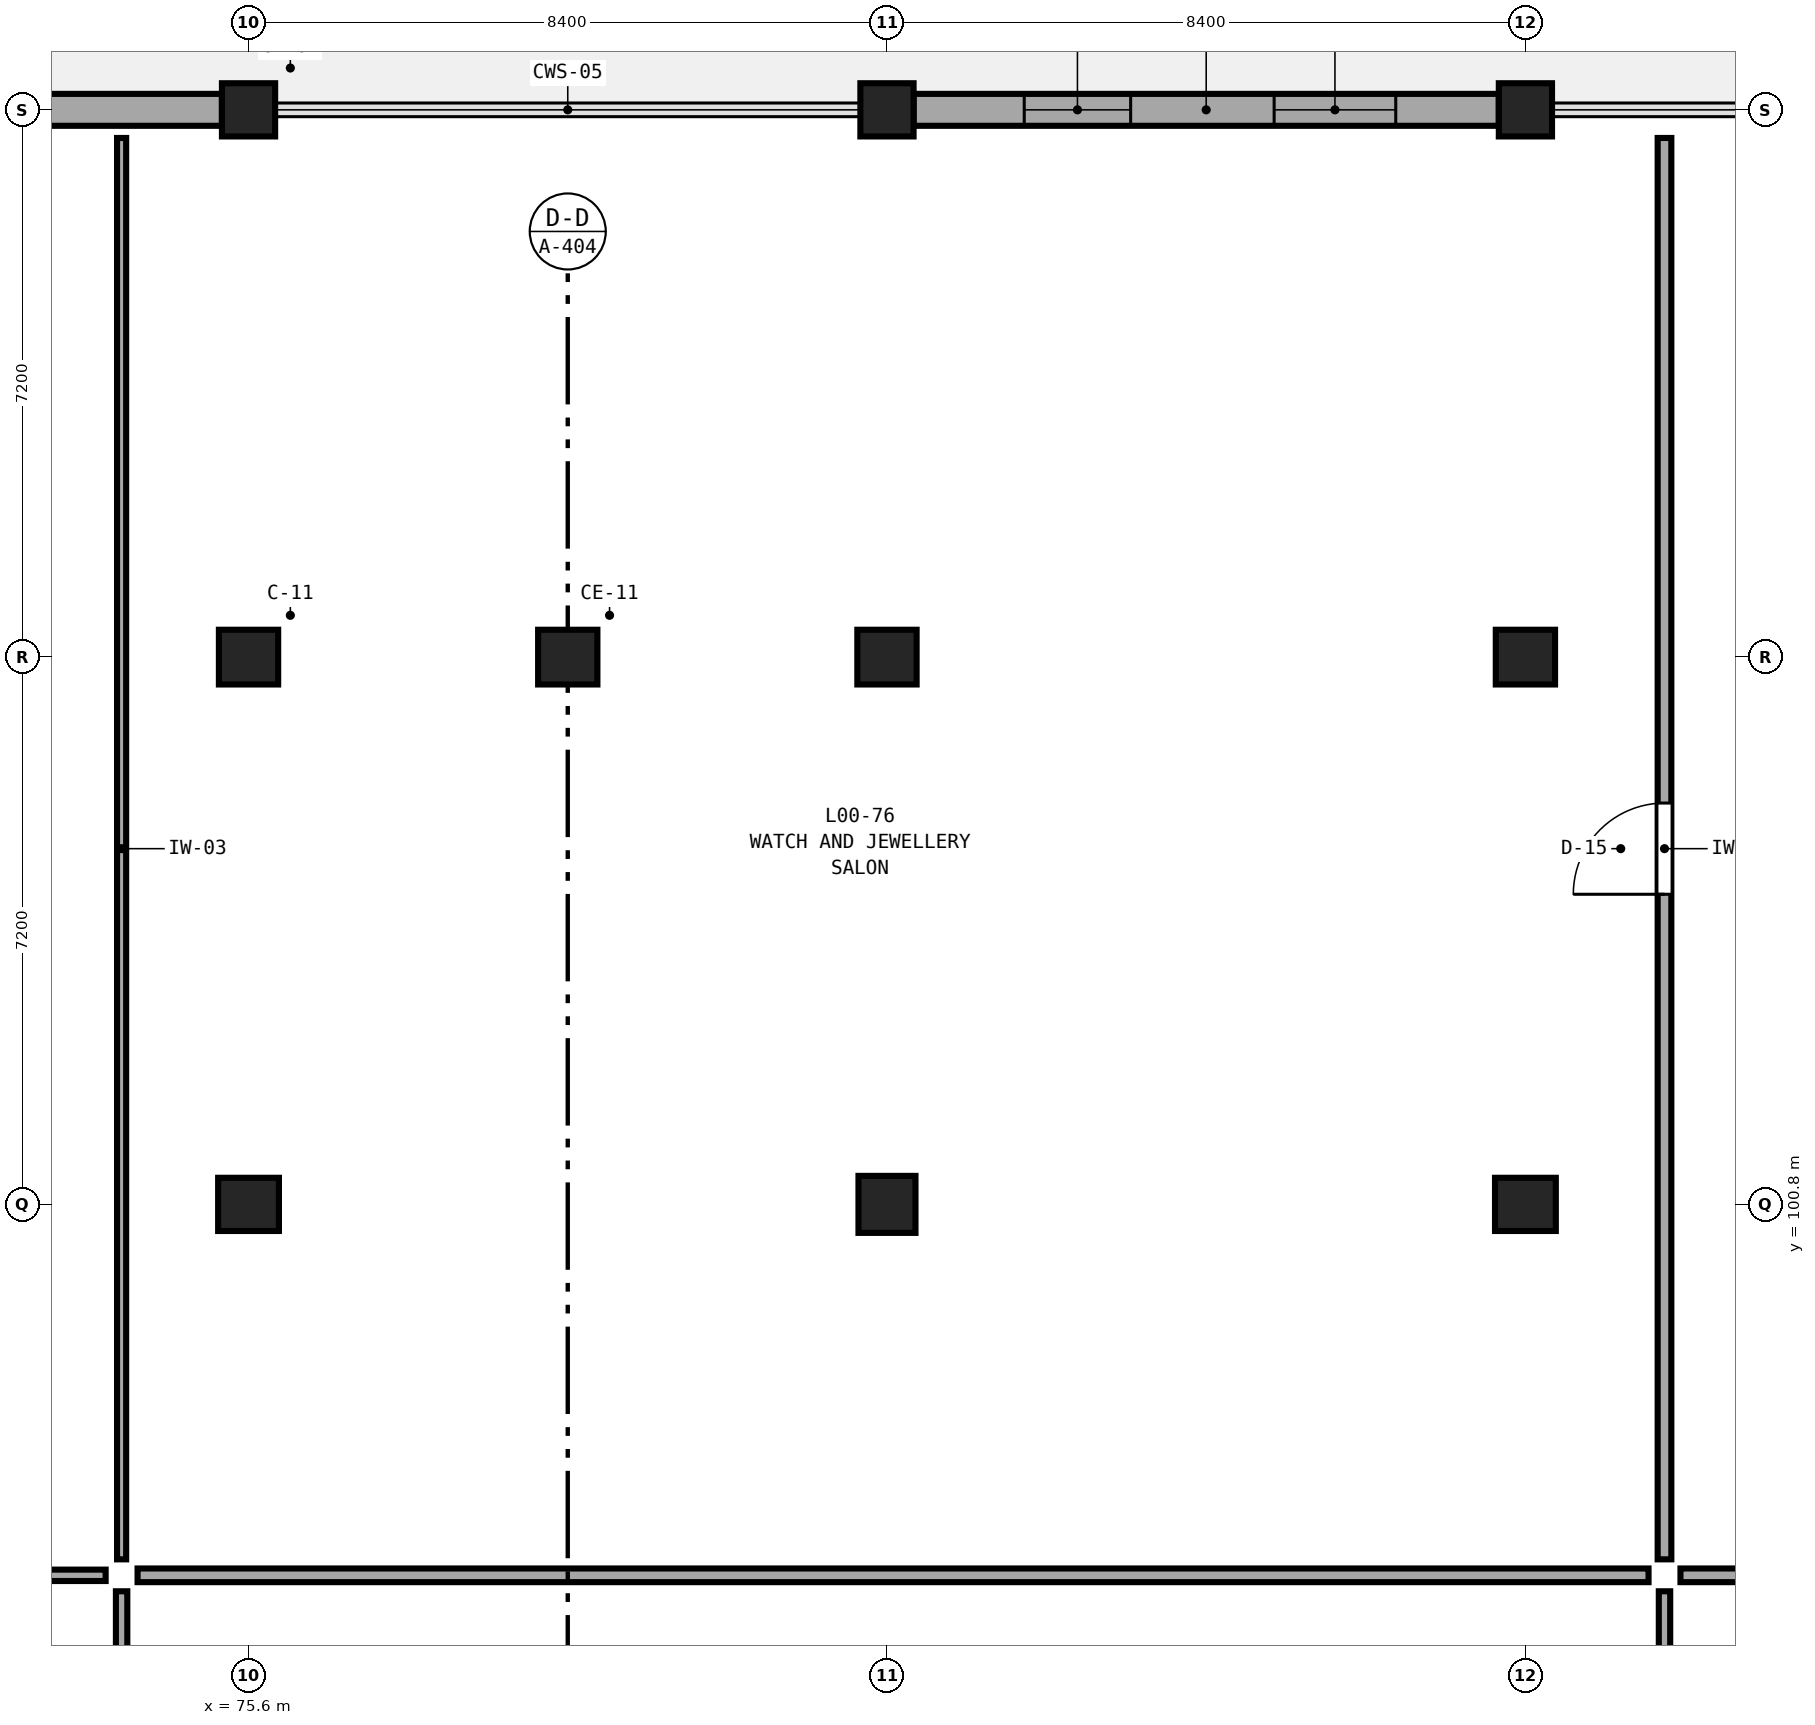
"""IFC4 building model, lengths in metres.
Left out: names, types, materials, properties, quantities, classifications, styles, units other than length and angle.
Written with IfcOpenShell. Run it as: python <this file> out.ifc"""

import sys

from ifc_helpers import new_model, si_unit, direction, frame, frame_2d, origin, origin_2d, place, context, subcontext, project, spatial, rectangle, extrude, element, fill, save


model = new_model("IFC4")
c1 = context("Model", 3, precision=1e-05, world=origin(), true_north=direction((0.0, 1.0)))
c2 = subcontext(c1, "Body", "Model", "MODEL_VIEW")
j1 = project(units=[si_unit("LENGTHUNIT", "METRE"), si_unit("PLANEANGLEUNIT", "RADIAN")], contexts=[c1])
p1 = place(None, origin())
s1 = spatial("IfcSite", under=j1, at=p1, CompositionType="ELEMENT")
p2 = place(p1, origin())
s2 = spatial("IfcBuilding", under=s1, at=p2, CompositionType="ELEMENT")
p3 = place(p2, origin())
s3 = spatial("IfcBuildingStorey", under=s2, at=p3, CompositionType="ELEMENT", Elevation=0.0)
p4 = place(p3, frame((75.6, 100.8, 0.0), z_axis=(0.0, 0.0, 1.0), x_axis=(1.0, 0.0, 0.0)))
e1 = element("IfcColumn", 1, at=p4, inside=s3, PredefinedType="COLUMN", context=c2, shape_type="SweptSolid", body=[
    extrude(rectangle(XDim=0.8, YDim=0.7, at=origin_2d()), origin(), (0.0, 0.0, 1.0), 5.4),
])
p5 = place(p3, frame((75.6, 108.0, 0.0), z_axis=(0.0, 0.0, 1.0), x_axis=(1.0, 0.0, 0.0)))
e2 = element("IfcColumn", 2, at=p5, inside=s3, PredefinedType="PILASTER", context=c2, shape_type="SweptSolid", body=[
    extrude(rectangle(XDim=0.78, YDim=0.72, at=origin_2d()), origin(), (0.0, 0.0, 1.0), 5.4),
])
p6 = place(p3, frame((75.6, 115.2, 0.0), z_axis=(0.0, 0.0, 1.0), x_axis=(1.0, 0.0, 0.0)))
e3 = element("IfcColumn", 3, at=p6, inside=s3, PredefinedType="COLUMN", context=c2, shape_type="SweptSolid", body=[
    extrude(rectangle(XDim=0.7, YDim=0.7, at=origin_2d()), origin(), (0.0, 0.0, 1.0), 5.4),
])
p7 = place(p3, frame((84.0, 100.8, 0.0), z_axis=(0.0, 0.0, 1.0), x_axis=(1.0, 0.0, 0.0)))
e4 = element("IfcColumn", 4, at=p7, inside=s3, PredefinedType="COLUMN", context=c2, shape_type="SweptSolid", body=[
    extrude(rectangle(XDim=0.75, YDim=0.75, at=origin_2d()), origin(), (0.0, 0.0, 1.0), 5.4),
])
p8 = place(p3, frame((84.0, 108.0, 0.0), z_axis=(0.0, 0.0, 1.0), x_axis=(1.0, 0.0, 0.0)))
e5 = element("IfcColumn", 5, at=p8, inside=s3, PredefinedType="PILASTER", context=c2, shape_type="SweptSolid", body=[
    extrude(rectangle(XDim=0.78, YDim=0.72, at=origin_2d()), origin(), (0.0, 0.0, 1.0), 5.4),
])
p9 = place(p3, frame((84.0, 115.2, 0.0), z_axis=(0.0, 0.0, 1.0), x_axis=(1.0, 0.0, 0.0)))
e6 = element("IfcColumn", 6, at=p9, inside=s3, PredefinedType="COLUMN", context=c2, shape_type="SweptSolid", body=[
    extrude(rectangle(XDim=0.7, YDim=0.7, at=origin_2d()), origin(), (0.0, 0.0, 1.0), 5.4),
])
p10 = place(p3, frame((92.4, 100.8, 0.0), z_axis=(0.0, 0.0, 1.0), x_axis=(1.0, 0.0, 0.0)))
e7 = element("IfcColumn", 7, at=p10, inside=s3, PredefinedType="COLUMN", context=c2, shape_type="SweptSolid", body=[
    extrude(rectangle(XDim=0.8, YDim=0.7, at=origin_2d()), origin(), (0.0, 0.0, 1.0), 5.4),
])
p11 = place(p3, frame((92.4, 108.0, 0.0), z_axis=(0.0, 0.0, 1.0), x_axis=(1.0, 0.0, 0.0)))
e8 = element("IfcColumn", 8, at=p11, inside=s3, PredefinedType="PILASTER", context=c2, shape_type="SweptSolid", body=[
    extrude(rectangle(XDim=0.78, YDim=0.72, at=origin_2d()), origin(), (0.0, 0.0, 1.0), 5.4),
])
p12 = place(p3, frame((92.4, 115.2, 0.0), z_axis=(0.0, 0.0, 1.0), x_axis=(1.0, 0.0, 0.0)))
e9 = element("IfcColumn", 9, at=p12, inside=s3, PredefinedType="COLUMN", context=c2, shape_type="SweptSolid", body=[
    extrude(rectangle(XDim=0.7, YDim=0.7, at=origin_2d()), origin(), (0.0, 0.0, 1.0), 5.4),
])
p13 = place(p3, frame((79.8, 108.0, 0.0), z_axis=(0.0, 0.0, 1.0), x_axis=(1.0, 0.0, 0.0)))
e10 = element("IfcColumn", 10, at=p13, inside=s3, PredefinedType="PILASTER", context=c2, shape_type="SweptSolid", body=[
    extrude(rectangle(XDim=0.78, YDim=0.72, at=origin_2d()), origin(), (0.0, 0.0, 1.0), 5.4),
])
p14 = place(p3, frame((67.55, 115.2, 0.0), z_axis=(0.0, 0.0, 1.0), x_axis=(1.0, 0.0, 0.0)))
e11 = element("IfcWall", 11, at=p14, inside=s3, PredefinedType="SOLIDWALL", context=c2, shape_type="SweptSolid", body=[
    extrude(rectangle(XDim=7.7, YDim=0.42, at=frame_2d((3.85, 0.0))), origin(), (0.0, 0.0, 1.0), 4.53),
])
p15 = place(p14, frame((2.85, 0.0, 0.0)))
e12 = element("IfcOpeningElement", 12, at=p15, cuts=e11, PredefinedType="OPENING", context=c2, shape_type="SweptSolid", body=[
    extrude(rectangle(XDim=2.0, YDim=2.4, at=frame_2d((1.0, 1.2))), frame((0.0, 0.23, 0.0), z_axis=(0.0, -1.0, 0.0), x_axis=(1.0, 0.0, 0.0)), (0.0, 0.0, 1.0), 0.46),
])
p16 = place(p3, frame((84.35, 115.2, 0.0), z_axis=(0.0, 0.0, 1.0), x_axis=(1.0, 0.0, 0.0)))
e13 = element("IfcWall", 13, at=p16, inside=s3, PredefinedType="SOLIDWALL", context=c2, shape_type="SweptSolid", body=[
    extrude(rectangle(XDim=7.7, YDim=0.42, at=frame_2d((3.85, 0.0))), origin(), (0.0, 0.0, 1.0), 4.53),
])
p17 = place(p16, frame((1.456, 0.0, 0.75)))
e14 = element("IfcOpeningElement", 14, at=p17, cuts=e13, PredefinedType="OPENING", context=c2, shape_type="SweptSolid", body=[
    extrude(rectangle(XDim=1.4, YDim=2.44, at=frame_2d((0.7, 1.22))), frame((0.0, 0.23, 0.0), z_axis=(0.0, -1.0, 0.0), x_axis=(1.0, 0.0, 0.0)), (0.0, 0.0, 1.0), 0.46),
])
p18 = place(p16, frame((4.744, 0.0, 0.75)))
e15 = element("IfcOpeningElement", 15, at=p18, cuts=e13, PredefinedType="OPENING", context=c2, shape_type="SweptSolid", body=[
    extrude(rectangle(XDim=1.6, YDim=2.44, at=frame_2d((0.8, 1.22))), frame((0.0, 0.23, 0.0), z_axis=(0.0, -1.0, 0.0), x_axis=(1.0, 0.0, 0.0)), (0.0, 0.0, 1.0), 0.46),
])
p19 = place(p3, frame((94.23, 96.13, 0.0), z_axis=(0.0, 0.0, 1.0), x_axis=(0.0, 1.0, 0.0)))
e16 = element("IfcWall", 16, at=p19, inside=s3, PredefinedType="PARTITIONING", context=c2, shape_type="SweptSolid", body=[
    extrude(rectangle(XDim=18.7, YDim=0.18, at=frame_2d((9.35, 0.0))), origin(), (0.0, 0.0, 1.0), 5.08),
])
p20 = place(p19, frame((8.75, 0.0, 0.0)))
e17 = element("IfcOpeningElement", 17, at=p20, cuts=e16, PredefinedType="OPENING", context=c2, shape_type="SweptSolid", body=[
    extrude(rectangle(XDim=1.2, YDim=2.21, at=frame_2d((0.6, 1.105))), frame((0.0, 0.11, 0.0), z_axis=(0.0, -1.0, 0.0), x_axis=(1.0, 0.0, 0.0)), (0.0, 0.0, 1.0), 0.22),
])
p21 = place(p3, frame((56.37, 95.92, 0.0), z_axis=(0.0, 0.0, 1.0), x_axis=(1.0, 0.0, 0.0)))
e18 = element("IfcWall", 18, at=p21, inside=s3, PredefinedType="PARTITIONING", context=c2, shape_type="SweptSolid", body=[
    extrude(rectangle(XDim=17.35, YDim=0.15, at=frame_2d((8.675, 0.0))), origin(), (0.0, 0.0, 1.0), 5.08),
])
p22 = place(p21, frame((7.995, 0.0, 0.0)))
e19 = element("IfcOpeningElement", 19, at=p22, cuts=e18, PredefinedType="OPENING", context=c2, shape_type="SweptSolid", body=[
    extrude(rectangle(XDim=1.36, YDim=2.37, at=frame_2d((0.68, 1.185))), frame((0.0, 0.095, 0.0), z_axis=(0.0, -1.0, 0.0), x_axis=(1.0, 0.0, 0.0)), (0.0, 0.0, 1.0), 0.19),
])
p23 = place(p3, frame((94.23, 86.09, 0.0), z_axis=(0.0, 0.0, 1.0), x_axis=(0.0, 1.0, 0.0)))
e20 = element("IfcWall", 20, at=p23, inside=s3, PredefinedType="PARTITIONING", context=c2, shape_type="SweptSolid", body=[
    extrude(rectangle(XDim=9.62, YDim=0.15, at=frame_2d((4.81, 0.0))), origin(), (0.0, 0.0, 1.0), 5.08),
])
p24 = place(p23, frame((4.37, 0.0, 0.0)))
e21 = element("IfcOpeningElement", 21, at=p24, cuts=e20, PredefinedType="OPENING", context=c2, shape_type="SweptSolid", body=[
    extrude(rectangle(XDim=0.88, YDim=2.21, at=frame_2d((0.44, 1.105))), frame((0.0, 0.095, 0.0), z_axis=(0.0, -1.0, 0.0), x_axis=(1.0, 0.0, 0.0)), (0.0, 0.0, 1.0), 0.19),
])
p25 = place(p3, frame((73.93, 86.44, 0.0), z_axis=(0.0, 0.0, 1.0), x_axis=(0.0, 1.0, 0.0)))
e22 = element("IfcWall", 22, at=p25, inside=s3, PredefinedType="PARTITIONING", context=c2, shape_type="SweptSolid", body=[
    extrude(rectangle(XDim=9.27, YDim=0.15, at=frame_2d((4.635, 0.0))), origin(), (0.0, 0.0, 1.0), 5.08),
])
p26 = place(p25, frame((4.195, 0.0, 0.0)))
e23 = element("IfcOpeningElement", 23, at=p26, cuts=e22, PredefinedType="OPENING", context=c2, shape_type="SweptSolid", body=[
    extrude(rectangle(XDim=0.88, YDim=2.29, at=frame_2d((0.44, 1.145))), frame((0.0, 0.095, 0.0), z_axis=(0.0, -1.0, 0.0), x_axis=(1.0, 0.0, 0.0)), (0.0, 0.0, 1.0), 0.19),
])
p27 = place(p3, frame((94.44, 95.92, 0.0), z_axis=(0.0, 0.0, 1.0), x_axis=(1.0, 0.0, 0.0)))
e24 = element("IfcWall", 24, at=p27, inside=s3, PredefinedType="PARTITIONING", context=c2, shape_type="SweptSolid", body=[
    extrude(rectangle(XDim=5.99, YDim=0.18, at=frame_2d((2.995, 0.0))), origin(), (0.0, 0.0, 1.0), 5.08),
])
p28 = place(p27, frame((2.155, 0.0, 0.0)))
e25 = element("IfcOpeningElement", 25, at=p28, cuts=e24, PredefinedType="OPENING", context=c2, shape_type="SweptSolid", body=[
    extrude(rectangle(XDim=1.68, YDim=2.05, at=frame_2d((0.84, 1.025))), frame((0.0, 0.11, 0.0), z_axis=(0.0, -1.0, 0.0), x_axis=(1.0, 0.0, 0.0)), (0.0, 0.0, 1.0), 0.22),
])
p29 = place(p3, frame((74.14, 95.92, 0.0), z_axis=(0.0, 0.0, 1.0), x_axis=(1.0, 0.0, 0.0)))
e26 = element("IfcWall", 26, at=p29, inside=s3, PredefinedType="PARTITIONING", context=c2, shape_type="SweptSolid", body=[
    extrude(rectangle(XDim=19.88, YDim=0.18, at=frame_2d((9.94, 0.0))), origin(), (0.0, 0.0, 1.0), 5.08),
])
p30 = place(p3, frame((73.93, 96.13, 0.0), z_axis=(0.0, 0.0, 1.0), x_axis=(0.0, 1.0, 0.0)))
e27 = element("IfcWall", 27, at=p30, inside=s3, PredefinedType="PARTITIONING", context=c2, shape_type="SweptSolid", body=[
    extrude(rectangle(XDim=18.7, YDim=0.12, at=frame_2d((9.35, 0.0))), origin(), (0.0, 0.0, 1.0), 5.08),
])
p31 = place(p17, origin())
e28 = element("IfcWindow", 28, at=p31, inside=s3, PartitioningType="DOUBLE_PANEL_VERTICAL", PredefinedType="WINDOW", context=c2, shape_type="SweptSolid", body=[
    extrude(rectangle(XDim=1.4, YDim=2.44, at=frame_2d((0.7, 1.22))), frame((0.0, 0.03, 0.0), z_axis=(0.0, -1.0, 0.0), x_axis=(1.0, 0.0, 0.0)), (0.0, 0.0, 1.0), 0.06),
])
fill(e14, e28)
p32 = place(p18, origin())
e29 = element("IfcWindow", 29, at=p32, inside=s3, PartitioningType="DOUBLE_PANEL_VERTICAL", PredefinedType="WINDOW", context=c2, shape_type="SweptSolid", body=[
    extrude(rectangle(XDim=1.6, YDim=2.44, at=frame_2d((0.8, 1.22))), frame((0.0, 0.03, 0.0), z_axis=(0.0, -1.0, 0.0), x_axis=(1.0, 0.0, 0.0)), (0.0, 0.0, 1.0), 0.06),
])
fill(e15, e29)
p33 = place(p20, origin())
e30 = element("IfcDoor", 30, at=p33, inside=s3, OperationType="SINGLE_SWING_LEFT", PredefinedType="DOOR", context=c2, shape_type="SweptSolid", body=[
    extrude(rectangle(XDim=1.2, YDim=2.21, at=frame_2d((0.6, 1.105))), frame((0.0, 0.025, 0.0), z_axis=(0.0, -1.0, 0.0), x_axis=(1.0, 0.0, 0.0)), (0.0, 0.0, 1.0), 0.05),
])
fill(e17, e30)
save(model, sys.argv[1])
